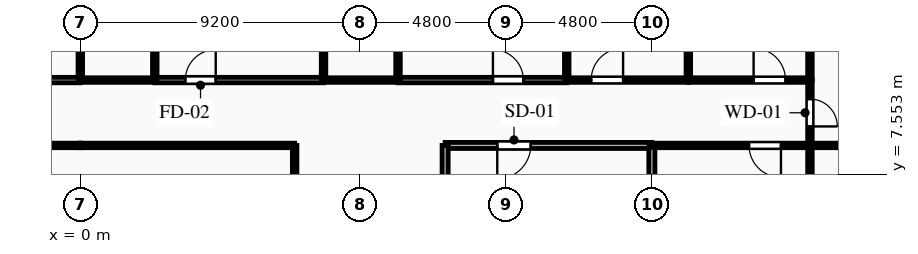
"""IFC4 building model, lengths in metres.
Left out: names, types, materials, properties, quantities, classifications, styles, units other than length and angle.
Written with IfcOpenShell. Run it as: python <this file> out.ifc"""

import sys

from ifc_helpers import new_model, si_unit, direction, frame, frame_2d, origin, place, context, subcontext, project, spatial, rectangle, extrude, element, fill, save


model = new_model("IFC4")
c1 = context("Model", 3, precision=1e-05, world=origin(), true_north=direction((0.0, 1.0)))
c2 = subcontext(c1, "Body", "Model", "MODEL_VIEW")
j1 = project(units=[si_unit("LENGTHUNIT", "METRE"), si_unit("PLANEANGLEUNIT", "RADIAN")], contexts=[c1])
p1 = place(None, origin())
s1 = spatial("IfcSite", under=j1, at=p1, CompositionType="ELEMENT")
p2 = place(p1, origin())
s2 = spatial("IfcBuilding", under=s1, at=p2, CompositionType="ELEMENT")
p3 = place(p2, frame((0.0, 0.0, 18.0)))
s3 = spatial("IfcBuildingStorey", under=s2, at=p3, CompositionType="ELEMENT", Elevation=18.0)
p4 = place(p3, frame((18.8, 8.5, 0.0), z_axis=(0.0, 0.0, 1.0), x_axis=(-1.0, 0.0, 0.0)))
e1 = element("IfcWall", 1, at=p4, inside=s3, PredefinedType="PARTITIONING", context=c2, shape_type="SweptSolid", body=[
    extrude(rectangle(XDim=6.8, YDim=0.2, at=frame_2d((3.4, 0.0))), origin(), (0.0, 0.0, 1.0), 4.17),
])
p5 = place(p4, frame((3.985, 0.0, 0.0)))
e2 = element("IfcOpeningElement", 2, at=p5, cuts=e1, PredefinedType="OPENING", context=c2, shape_type="SweptSolid", body=[
    extrude(rectangle(XDim=1.1, YDim=2.15, at=frame_2d((0.55, 1.075))), frame((0.0, 0.11, 0.0), z_axis=(0.0, -1.0, 0.0), x_axis=(1.0, 0.0, 0.0)), (0.0, 0.0, 1.0), 0.22),
])
p6 = place(p3, frame((12.0, 8.5, 0.0), z_axis=(0.0, 0.0, 1.0), x_axis=(0.0, -1.0, 0.0)))
e3 = element("IfcWall", 3, at=p6, inside=s3, PredefinedType="PARTITIONING", context=c2, shape_type="SweptSolid", body=[
    extrude(rectangle(XDim=2.9, YDim=0.2, at=frame_2d((1.45, 0.0))), origin(), (0.0, 0.0, 1.0), 4.17),
])
p7 = place(p3, frame((18.8, 5.6, 0.0), z_axis=(0.0, 0.0, 1.0), x_axis=(0.0, 1.0, 0.0)))
e4 = element("IfcWall", 4, at=p7, inside=s3, PredefinedType="PARTITIONING", context=c2, shape_type="SweptSolid", body=[
    extrude(rectangle(XDim=2.9, YDim=0.2, at=frame_2d((1.45, 0.0))), origin(), (0.0, 0.0, 1.0), 3.655),
])
p8 = place(p3, frame((-5.55, 10.65, 0.0), z_axis=(0.0, 0.0, 1.0), x_axis=(1.0, 0.0, 0.0)))
e5 = element("IfcWall", 5, at=p8, inside=s3, PredefinedType="PARTITIONING", context=c2, shape_type="SweptSolid", body=[
    extrude(rectangle(XDim=5.55, YDim=0.18, at=frame_2d((2.775, 0.0))), origin(), (0.0, 0.0, 1.0), 4.17),
])
p9 = place(p8, frame((3.123, 0.0, 0.0)))
e6 = element("IfcOpeningElement", 6, at=p9, cuts=e5, PredefinedType="OPENING", context=c2, shape_type="SweptSolid", body=[
    extrude(rectangle(XDim=1.0, YDim=2.15, at=frame_2d((0.5, 1.075))), frame((0.0, 0.1, 0.0), z_axis=(0.0, -1.0, 0.0), x_axis=(1.0, 0.0, 0.0)), (0.0, 0.0, 1.0), 0.2),
])
p10 = place(p3, frame((0.0, 8.5, 0.0), z_axis=(0.0, 0.0, 1.0), x_axis=(-1.0, 0.0, 0.0)))
e7 = element("IfcWall", 7, at=p10, inside=s3, PredefinedType="PARTITIONING", context=c2, shape_type="SweptSolid", body=[
    extrude(rectangle(XDim=7.05, YDim=0.15, at=frame_2d((3.525, 0.0))), origin(), (0.0, 0.0, 1.0), 4.17),
])
p11 = place(p3, frame((24.0, 10.65, 0.0), z_axis=(0.0, 0.0, 1.0), x_axis=(0.0, -1.0, 0.0)))
e8 = element("IfcWall", 8, at=p11, inside=s3, PredefinedType="PARTITIONING", context=c2, shape_type="SweptSolid", body=[
    extrude(rectangle(XDim=2.15, YDim=0.15, at=frame_2d((1.075, 0.0))), origin(), (0.0, 0.0, 1.0), 4.17),
])
p12 = place(p11, frame((0.625, 0.0, 0.0)))
e9 = element("IfcOpeningElement", 9, at=p12, cuts=e8, PredefinedType="OPENING", context=c2, shape_type="SweptSolid", body=[
    extrude(rectangle(XDim=0.9, YDim=2.1, at=frame_2d((0.45, 1.05))), frame((0.0, 0.085, 0.0), z_axis=(0.0, -1.0, 0.0), x_axis=(1.0, 0.0, 0.0)), (0.0, 0.0, 1.0), 0.17),
])
p13 = place(p3, frame((24.0, 8.5, 0.0), z_axis=(0.0, 0.0, 1.0), x_axis=(-1.0, 0.0, 0.0)))
e10 = element("IfcWall", 10, at=p13, inside=s3, PredefinedType="PARTITIONING", context=c2, shape_type="SweptSolid", body=[
    extrude(rectangle(XDim=5.2, YDim=0.15, at=frame_2d((2.6, 0.0))), origin(), (0.0, 0.0, 1.0), 4.17),
])
p14 = place(p13, frame((0.954, 0.0, 0.0)))
e11 = element("IfcOpeningElement", 11, at=p14, cuts=e10, PredefinedType="OPENING", context=c2, shape_type="SweptSolid", body=[
    extrude(rectangle(XDim=1.05, YDim=2.15, at=frame_2d((0.525, 1.075))), frame((0.0, 0.085, 0.0), z_axis=(0.0, -1.0, 0.0), x_axis=(1.0, 0.0, 0.0)), (0.0, 0.0, 1.0), 0.17),
])
p15 = place(p3, frame((2.45, 10.65, 0.0), z_axis=(0.0, 0.0, 1.0), x_axis=(1.0, 0.0, 0.0)))
e12 = element("IfcWall", 12, at=p15, inside=s3, PredefinedType="PARTITIONING", context=c2, shape_type="SweptSolid", body=[
    extrude(rectangle(XDim=5.55, YDim=0.18, at=frame_2d((2.775, 0.0))), origin(), (0.0, 0.0, 1.0), 4.17),
])
p16 = place(p15, frame((1.004, 0.0, 0.0)))
e13 = element("IfcOpeningElement", 13, at=p16, cuts=e12, PredefinedType="OPENING", context=c2, shape_type="SweptSolid", body=[
    extrude(rectangle(XDim=1.0, YDim=2.15, at=frame_2d((0.5, 1.075))), frame((0.0, 0.1, 0.0), z_axis=(0.0, -1.0, 0.0), x_axis=(1.0, 0.0, 0.0)), (0.0, 0.0, 1.0), 0.2),
])
p17 = place(p3, frame((0.0, 10.65, 0.0), z_axis=(0.0, 0.0, 1.0), x_axis=(1.0, 0.0, 0.0)))
e14 = element("IfcWall", 14, at=p17, inside=s3, PredefinedType="PLUMBINGWALL", context=c2, shape_type="SweptSolid", body=[
    extrude(rectangle(XDim=2.45, YDim=0.15, at=frame_2d((1.225, 0.0))), origin(), (0.0, 0.0, 1.0), 4.17),
])
p18 = place(p3, frame((10.45, 10.65, 0.0), z_axis=(0.0, 0.0, 1.0), x_axis=(1.0, 0.0, 0.0)))
e15 = element("IfcWall", 15, at=p18, inside=s3, PredefinedType="PARTITIONING", context=c2, shape_type="SweptSolid", body=[
    extrude(rectangle(XDim=5.55, YDim=0.18, at=frame_2d((2.775, 0.0))), origin(), (0.0, 0.0, 1.0), 4.17),
])
p19 = place(p18, frame((3.123, 0.0, 0.0)))
e16 = element("IfcOpeningElement", 16, at=p19, cuts=e15, PredefinedType="OPENING", context=c2, shape_type="SweptSolid", body=[
    extrude(rectangle(XDim=1.0, YDim=2.15, at=frame_2d((0.5, 1.075))), frame((0.0, 0.1, 0.0), z_axis=(0.0, -1.0, 0.0), x_axis=(1.0, 0.0, 0.0)), (0.0, 0.0, 1.0), 0.2),
])
p20 = place(p3, frame((8.0, 10.65, 0.0), z_axis=(0.0, 0.0, 1.0), x_axis=(1.0, 0.0, 0.0)))
e17 = element("IfcWall", 17, at=p20, inside=s3, PredefinedType="PLUMBINGWALL", context=c2, shape_type="SweptSolid", body=[
    extrude(rectangle(XDim=2.45, YDim=0.15, at=frame_2d((1.225, 0.0))), origin(), (0.0, 0.0, 1.0), 4.17),
])
p21 = place(p3, frame((16.0, 10.65, 0.0), z_axis=(0.0, 0.0, 1.0), x_axis=(1.0, 0.0, 0.0)))
e18 = element("IfcWall", 18, at=p21, inside=s3, PredefinedType="PARTITIONING", context=c2, shape_type="SweptSolid", body=[
    extrude(rectangle(XDim=4.0, YDim=0.15, at=frame_2d((2.0, 0.0))), origin(), (0.0, 0.0, 1.0), 4.17),
])
p22 = place(p21, frame((0.804, 0.0, 0.0)))
e19 = element("IfcOpeningElement", 19, at=p22, cuts=e18, PredefinedType="OPENING", context=c2, shape_type="SweptSolid", body=[
    extrude(rectangle(XDim=1.05, YDim=2.15, at=frame_2d((0.525, 1.075))), frame((0.0, 0.085, 0.0), z_axis=(0.0, -1.0, 0.0), x_axis=(1.0, 0.0, 0.0)), (0.0, 0.0, 1.0), 0.17),
])
p23 = place(p3, frame((20.0, 10.65, 0.0), z_axis=(0.0, 0.0, 1.0), x_axis=(1.0, 0.0, 0.0)))
e20 = element("IfcWall", 20, at=p23, inside=s3, PredefinedType="PARTITIONING", context=c2, shape_type="SweptSolid", body=[
    extrude(rectangle(XDim=4.0, YDim=0.15, at=frame_2d((2.0, 0.0))), origin(), (0.0, 0.0, 1.0), 4.17),
])
p24 = place(p23, frame((2.146, 0.0, 0.0)))
e21 = element("IfcOpeningElement", 21, at=p24, cuts=e20, PredefinedType="OPENING", context=c2, shape_type="SweptSolid", body=[
    extrude(rectangle(XDim=1.05, YDim=2.15, at=frame_2d((0.525, 1.075))), frame((0.0, 0.085, 0.0), z_axis=(0.0, -1.0, 0.0), x_axis=(1.0, 0.0, 0.0)), (0.0, 0.0, 1.0), 0.17),
])
p25 = place(p3, frame((7.05, 8.5, 0.0), z_axis=(0.0, 0.0, 1.0), x_axis=(-1.0, 0.0, 0.0)))
e22 = element("IfcWall", 22, at=p25, inside=s3, PredefinedType="PARTITIONING", context=c2, shape_type="SweptSolid", body=[
    extrude(rectangle(XDim=7.05, YDim=0.15, at=frame_2d((3.525, 0.0))), origin(), (0.0, 0.0, 1.0), 4.17),
])
p26 = place(p3, frame((7.05, -5.6, 0.0), z_axis=(0.0, 0.0, 1.0), x_axis=(0.0, 1.0, 0.0)))
e23 = element("IfcWall", 23, at=p26, inside=s3, PredefinedType="PARTITIONING", context=c2, shape_type="SweptSolid", body=[
    extrude(rectangle(XDim=14.1, YDim=0.15, at=frame_2d((7.05, 0.0))), origin(), (0.0, 0.0, 1.0), 4.17),
])
p27 = place(p3, frame((24.0, 8.5, 0.0), z_axis=(0.0, 0.0, 1.0), x_axis=(1.0, 0.0, 0.0)))
e24 = element("IfcWall", 24, at=p27, inside=s3, PredefinedType="PARTITIONING", context=c2, shape_type="SweptSolid", body=[
    extrude(rectangle(XDim=2.65, YDim=0.15, at=frame_2d((1.325, 0.0))), origin(), (0.0, 0.0, 1.0), 4.17),
])
p28 = place(p27, frame((0.965, 0.0, 0.0)))
e25 = element("IfcOpeningElement", 25, at=p28, cuts=e24, PredefinedType="OPENING", context=c2, shape_type="SweptSolid", body=[
    extrude(rectangle(XDim=1.05, YDim=2.15, at=frame_2d((0.525, 1.075))), frame((0.0, 0.085, 0.0), z_axis=(0.0, -1.0, 0.0), x_axis=(1.0, 0.0, 0.0)), (0.0, 0.0, 1.0), 0.17),
])
p29 = place(p3, frame((24.0, -5.6, 0.0), z_axis=(0.0, 0.0, 1.0), x_axis=(0.0, 1.0, 0.0)))
e26 = element("IfcWall", 26, at=p29, inside=s3, PredefinedType="PARTITIONING", context=c2, shape_type="SweptSolid", body=[
    extrude(rectangle(XDim=14.1, YDim=0.15, at=frame_2d((7.05, 0.0))), origin(), (0.0, 0.0, 1.0), 4.17),
])
p30 = place(p3, frame((24.0, 10.65, 0.0), z_axis=(0.0, 0.0, 1.0), x_axis=(0.0, 1.0, 0.0)))
e27 = element("IfcWall", 27, at=p30, inside=s3, PredefinedType="PARTITIONING", context=c2, shape_type="SweptSolid", body=[
    extrude(rectangle(XDim=14.15, YDim=0.15, at=frame_2d((7.075, 0.0))), origin(), (0.0, 0.0, 1.0), 4.17),
])
for number, where, z_axis, x_axis in (
    (28, (0.0, 12.8, 0.0), (0.0, 0.0, 1.0), (0.0, -1.0, 0.0)),
    (29, (2.45, 10.65, 0.0), (0.0, 0.0, 1.0), (0.0, 1.0, 0.0)),
    (30, (8.0, 12.8, 0.0), (0.0, 0.0, 1.0), (0.0, -1.0, 0.0)),
    (31, (10.45, 10.65, 0.0), (0.0, 0.0, 1.0), (0.0, 1.0, 0.0)),
):
    element("IfcWall", number, at=place(p3, frame(where, z_axis=z_axis, x_axis=x_axis)), inside=s3, PredefinedType="PLUMBINGWALL", context=c2, shape_type="SweptSolid", body=[
        extrude(rectangle(XDim=2.15, YDim=0.15, at=frame_2d((1.075, 0.0))), origin(), (0.0, 0.0, 1.0), 4.17),
    ])
for number, where, z_axis, x_axis in (
    (32, (16.0, 24.8, 0.0), (0.0, 0.0, 1.0), (0.0, -1.0, 0.0)),
    (33, (20.0, 24.8, 0.0), (0.0, 0.0, 1.0), (0.0, -1.0, 0.0)),
):
    element("IfcWall", number, at=place(p3, frame(where, z_axis=z_axis, x_axis=x_axis)), inside=s3, PredefinedType="PARTITIONING", context=c2, shape_type="SweptSolid", body=[
        extrude(rectangle(XDim=14.15, YDim=0.15, at=frame_2d((7.075, 0.0))), origin(), (0.0, 0.0, 1.0), 4.17),
    ])
p31 = place(p5, origin())
e34 = element("IfcDoor", 34, at=p31, inside=s3, OperationType="SINGLE_SWING_RIGHT", PredefinedType="DOOR", context=c2, shape_type="SweptSolid", body=[
    extrude(rectangle(XDim=1.1, YDim=2.15, at=frame_2d((0.55, 1.075))), frame((0.0, 0.025, 0.0), z_axis=(0.0, -1.0, 0.0), x_axis=(1.0, 0.0, 0.0)), (0.0, 0.0, 1.0), 0.05),
])
fill(e2, e34)
p32 = place(p12, origin())
e35 = element("IfcDoor", 35, at=p32, inside=s3, OperationType="SINGLE_SWING_RIGHT", PredefinedType="DOOR", context=c2, shape_type="SweptSolid", body=[
    extrude(rectangle(XDim=0.9, YDim=2.1, at=frame_2d((0.45, 1.05))), frame((0.0, 0.025, 0.0), z_axis=(0.0, -1.0, 0.0), x_axis=(1.0, 0.0, 0.0)), (0.0, 0.0, 1.0), 0.05),
])
fill(e9, e35)
p33 = place(p14, origin())
e36 = element("IfcDoor", 36, at=p33, inside=s3, OperationType="SINGLE_SWING_LEFT", PredefinedType="DOOR", context=c2, shape_type="SweptSolid", body=[
    extrude(rectangle(XDim=1.05, YDim=2.15, at=frame_2d((0.525, 1.075))), frame((0.0, 0.025, 0.0), z_axis=(0.0, -1.0, 0.0), x_axis=(1.0, 0.0, 0.0)), (0.0, 0.0, 1.0), 0.05),
])
fill(e11, e36)
p34 = place(p16, origin())
e37 = element("IfcDoor", 37, at=p34, inside=s3, OperationType="SINGLE_SWING_RIGHT", PredefinedType="DOOR", context=c2, shape_type="SweptSolid", body=[
    extrude(rectangle(XDim=1.0, YDim=2.15, at=frame_2d((0.5, 1.075))), frame((0.0, 0.025, 0.0), z_axis=(0.0, -1.0, 0.0), x_axis=(1.0, 0.0, 0.0)), (0.0, 0.0, 1.0), 0.05),
])
fill(e13, e37)
p35 = place(p19, origin())
e38 = element("IfcDoor", 38, at=p35, inside=s3, OperationType="SINGLE_SWING_LEFT", PredefinedType="DOOR", context=c2, shape_type="SweptSolid", body=[
    extrude(rectangle(XDim=1.0, YDim=2.15, at=frame_2d((0.5, 1.075))), frame((0.0, 0.025, 0.0), z_axis=(0.0, -1.0, 0.0), x_axis=(1.0, 0.0, 0.0)), (0.0, 0.0, 1.0), 0.05),
])
fill(e16, e38)
p36 = place(p22, origin())
e39 = element("IfcDoor", 39, at=p36, inside=s3, OperationType="SINGLE_SWING_RIGHT", PredefinedType="DOOR", context=c2, shape_type="SweptSolid", body=[
    extrude(rectangle(XDim=1.05, YDim=2.15, at=frame_2d((0.525, 1.075))), frame((0.0, 0.025, 0.0), z_axis=(0.0, -1.0, 0.0), x_axis=(1.0, 0.0, 0.0)), (0.0, 0.0, 1.0), 0.05),
])
fill(e19, e39)
p37 = place(p24, origin())
e40 = element("IfcDoor", 40, at=p37, inside=s3, OperationType="SINGLE_SWING_LEFT", PredefinedType="DOOR", context=c2, shape_type="SweptSolid", body=[
    extrude(rectangle(XDim=1.05, YDim=2.15, at=frame_2d((0.525, 1.075))), frame((0.0, 0.025, 0.0), z_axis=(0.0, -1.0, 0.0), x_axis=(1.0, 0.0, 0.0)), (0.0, 0.0, 1.0), 0.05),
])
fill(e21, e40)
save(model, sys.argv[1])
